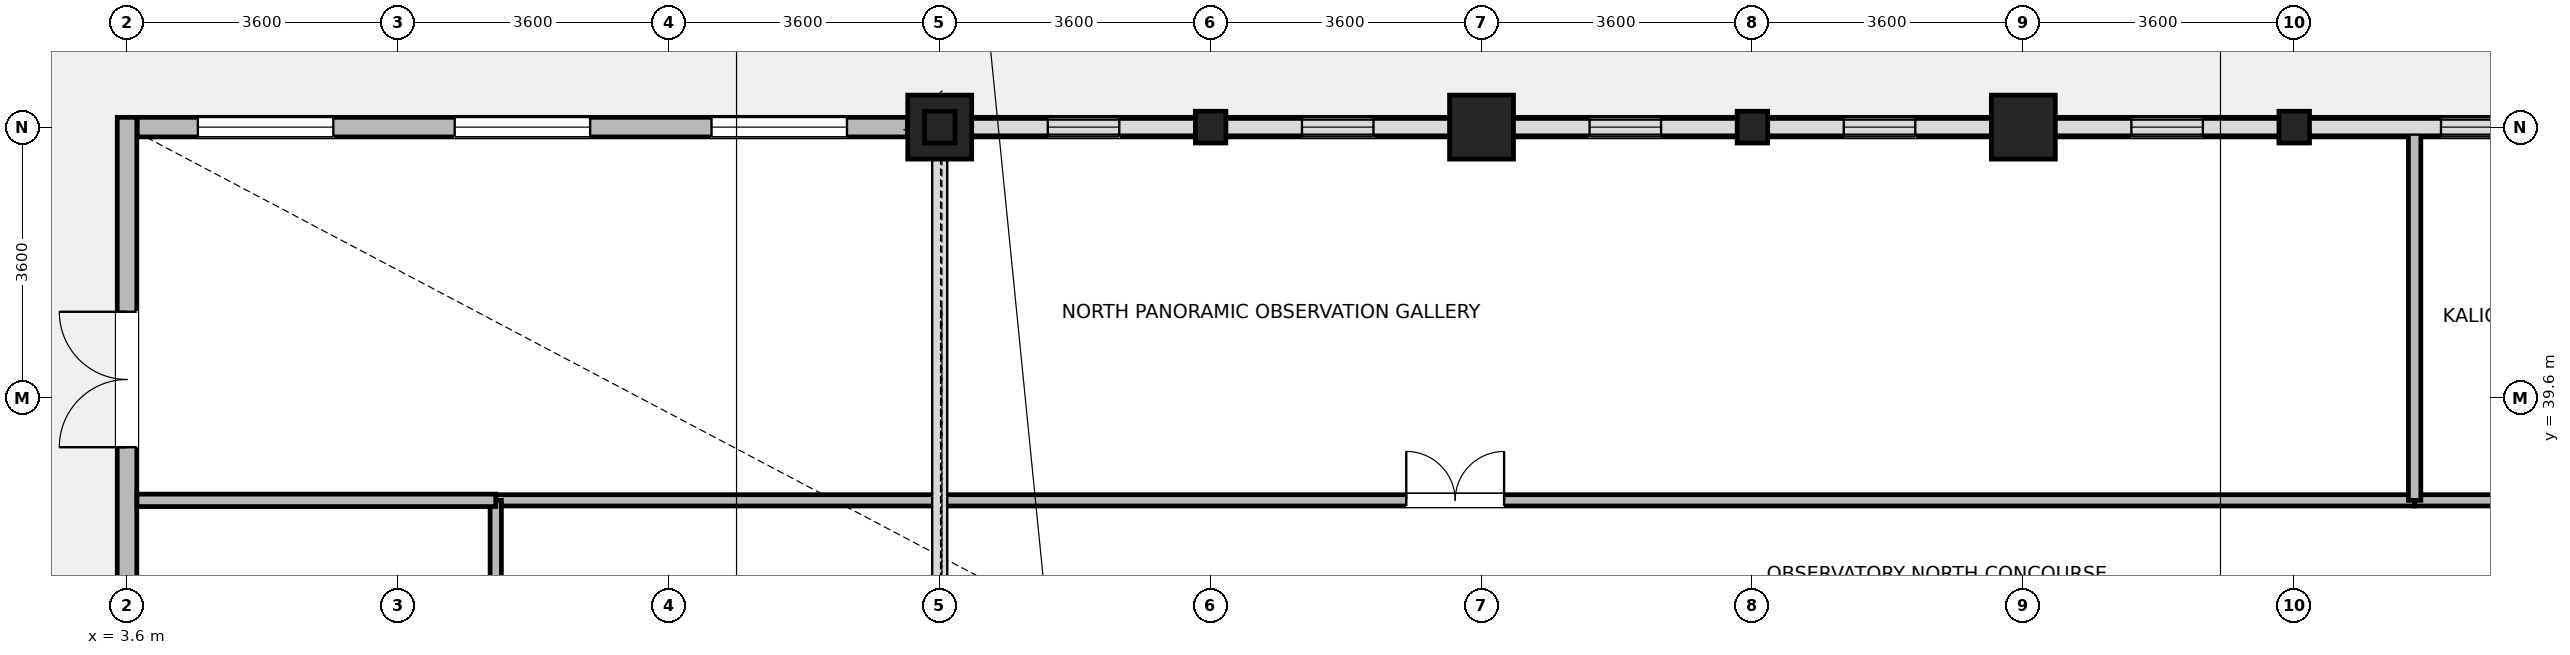
"""IFC4 building model, lengths in metres.
Left out: names, types, materials, properties, quantities, classifications, styles, units other than length and angle.
Written with IfcOpenShell. Run it as: python <this file> out.ifc"""

import sys

from ifc_helpers import new_model, si_unit, direction, frame, frame_2d, origin, origin_2d, place, context, subcontext, project, spatial, rectangle, i_section, extrude, source, transform, mapped, element, fill, save


model = new_model("IFC4")
c1 = context("Model", 3, precision=1e-05, world=origin(), true_north=direction((0.0, 1.0)))
c2 = subcontext(c1, "Body", "Model", "MODEL_VIEW")
j1 = project(units=[si_unit("LENGTHUNIT", "METRE"), si_unit("PLANEANGLEUNIT", "RADIAN")], contexts=[c1])
p1 = place(None, origin())
s1 = spatial("IfcSite", under=j1, at=p1, CompositionType="ELEMENT")
p2 = place(p1, origin())
s2 = spatial("IfcBuilding", under=s1, at=p2, CompositionType="ELEMENT")
p3 = place(p2, frame((0.0, 0.0, 298.0)))
s3 = spatial("IfcBuildingStorey", under=s2, at=p3, CompositionType="ELEMENT", Elevation=298.0)
m1 = source(origin(), c2, "Body", "SweptSolid", [
    extrude(rectangle(XDim=0.85, YDim=0.85, at=origin_2d()), origin(), (0.0, 0.0, 1.0), 6.0),
])
for number, where, z_axis, x_axis in (
    (1, (14.4, 43.2, 0.0), (0.0, 0.0, 1.0), (1.0, 0.0, 0.0)),
    (2, (21.6, 43.2, 0.0), (0.0, 0.0, 1.0), (1.0, 0.0, 0.0)),
    (3, (28.8, 43.2, 0.0), (0.0, 0.0, 1.0), (1.0, 0.0, 0.0)),
):
    element("IfcColumn", number, at=place(p3, frame(where, z_axis=z_axis, x_axis=x_axis)), inside=s3, PredefinedType="COLUMN", context=c2, shape_type="MappedRepresentation", body=[
        mapped(m1, transform((0.0, 0.0, 0.0), x_axis=(1.0, 0.0, 0.0), y_axis=(0.0, 1.0, 0.0), z_axis=(0.0, 0.0, 1.0), scale=1.0)),
    ])
m2 = source(origin(), c2, "Body", "SweptSolid", [
    extrude(i_section(OverallWidth=0.406, OverallDepth=0.422, WebThickness=0.023, FlangeThickness=0.031, FilletRadius=0.015, at=origin_2d()), origin(), (0.0, 0.0, 1.0), 6.0),
])
for number, where, z_axis, x_axis in (
    (4, (18.0, 43.2, 0.0), (0.0, 0.0, 1.0), (1.0, 0.0, 0.0)),
    (5, (25.2, 43.2, 0.0), (0.0, 0.0, 1.0), (1.0, 0.0, 0.0)),
    (6, (32.4, 43.2, 0.0), (0.0, 0.0, 1.0), (1.0, 0.0, 0.0)),
):
    element("IfcColumn", number, at=place(p3, frame(where, z_axis=z_axis, x_axis=x_axis)), inside=s3, PredefinedType="COLUMN", context=c2, shape_type="MappedRepresentation", body=[
        mapped(m2, transform((0.0, 0.0, 0.0), x_axis=(1.0, 0.0, 0.0), y_axis=(0.0, 1.0, 0.0), z_axis=(0.0, 0.0, 1.0), scale=1.0)),
    ])
m3 = source(origin(), c2, "Body", "SweptSolid", [
    extrude(i_section(OverallWidth=0.406, OverallDepth=0.422, WebThickness=0.023, FlangeThickness=0.031, FilletRadius=0.015, at=origin_2d()), origin(), (0.0, 0.0, 1.0), 15.0),
])
p4 = place(p3, frame((14.4, 43.2, 6.0), z_axis=(0.0, 0.0, 1.0), x_axis=(1.0, 0.0, 0.0)))
e7 = element("IfcColumn", 7, at=p4, inside=s3, PredefinedType="COLUMN", context=c2, shape_type="MappedRepresentation", body=[
    mapped(m3, transform((0.0, 0.0, 0.0), x_axis=(1.0, 0.0, 0.0), y_axis=(0.0, 1.0, 0.0), z_axis=(0.0, 0.0, 1.0), scale=1.0)),
])
p5 = place(p3, frame((32.604, 43.2, 0.0), z_axis=(0.0, 0.0, 1.0), x_axis=(1.0, 0.0, 0.0)))
e8 = element("IfcWall", 8, at=p5, inside=s3, PredefinedType="STANDARD", context=c2, shape_type="SweptSolid", body=[
    extrude(rectangle(XDim=2.97, YDim=0.26, at=frame_2d((1.485, 0.0))), origin(), (0.0, 0.0, 1.0), 5.58),
])
p6 = place(p5, frame((1.747, 0.0, 0.85)))
e9 = element("IfcOpeningElement", 9, at=p6, cuts=e8, PredefinedType="OPENING", context=c2, shape_type="SweptSolid", body=[
    extrude(rectangle(XDim=0.95, YDim=1.75, at=frame_2d((0.475, 0.875))), frame((0.0, 0.14, 0.0), z_axis=(0.0, -1.0, 0.0), x_axis=(1.0, 0.0, 0.0)), (0.0, 0.0, 1.0), 0.28),
])
p7 = place(p3, frame((29.226, 43.2, 0.0), z_axis=(0.0, 0.0, 1.0), x_axis=(1.0, 0.0, 0.0)))
e10 = element("IfcWall", 10, at=p7, inside=s3, PredefinedType="STANDARD", context=c2, shape_type="SweptSolid", body=[
    extrude(rectangle(XDim=2.97, YDim=0.26, at=frame_2d((1.485, 0.0))), origin(), (0.0, 0.0, 1.0), 5.58),
])
p8 = place(p7, frame((1.01, 0.0, 0.85)))
e11 = element("IfcOpeningElement", 11, at=p8, cuts=e10, PredefinedType="OPENING", context=c2, shape_type="SweptSolid", body=[
    extrude(rectangle(XDim=0.95, YDim=1.75, at=frame_2d((0.475, 0.875))), frame((0.0, 0.14, 0.0), z_axis=(0.0, -1.0, 0.0), x_axis=(1.0, 0.0, 0.0)), (0.0, 0.0, 1.0), 0.28),
])
p9 = place(p3, frame((25.404, 43.2, 0.0), z_axis=(0.0, 0.0, 1.0), x_axis=(1.0, 0.0, 0.0)))
e12 = element("IfcWall", 12, at=p9, inside=s3, PredefinedType="STANDARD", context=c2, shape_type="SweptSolid", body=[
    extrude(rectangle(XDim=2.97, YDim=0.26, at=frame_2d((1.485, 0.0))), origin(), (0.0, 0.0, 1.0), 5.58),
])
p10 = place(p9, frame((1.01, 0.0, 0.85)))
e13 = element("IfcOpeningElement", 13, at=p10, cuts=e12, PredefinedType="OPENING", context=c2, shape_type="SweptSolid", body=[
    extrude(rectangle(XDim=0.95, YDim=1.75, at=frame_2d((0.475, 0.875))), frame((0.0, 0.14, 0.0), z_axis=(0.0, -1.0, 0.0), x_axis=(1.0, 0.0, 0.0)), (0.0, 0.0, 1.0), 0.28),
])
p11 = place(p3, frame((22.026, 43.2, 0.0), z_axis=(0.0, 0.0, 1.0), x_axis=(1.0, 0.0, 0.0)))
e14 = element("IfcWall", 14, at=p11, inside=s3, PredefinedType="STANDARD", context=c2, shape_type="SweptSolid", body=[
    extrude(rectangle(XDim=2.97, YDim=0.26, at=frame_2d((1.485, 0.0))), origin(), (0.0, 0.0, 1.0), 5.58),
])
p12 = place(p11, frame((1.01, 0.0, 0.85)))
e15 = element("IfcOpeningElement", 15, at=p12, cuts=e14, PredefinedType="OPENING", context=c2, shape_type="SweptSolid", body=[
    extrude(rectangle(XDim=0.95, YDim=1.75, at=frame_2d((0.475, 0.875))), frame((0.0, 0.14, 0.0), z_axis=(0.0, -1.0, 0.0), x_axis=(1.0, 0.0, 0.0)), (0.0, 0.0, 1.0), 0.28),
])
p13 = place(p3, frame((18.204, 43.2, 0.0), z_axis=(0.0, 0.0, 1.0), x_axis=(1.0, 0.0, 0.0)))
e16 = element("IfcWall", 16, at=p13, inside=s3, PredefinedType="STANDARD", context=c2, shape_type="SweptSolid", body=[
    extrude(rectangle(XDim=2.97, YDim=0.26, at=frame_2d((1.485, 0.0))), origin(), (0.0, 0.0, 1.0), 5.58),
])
p14 = place(p13, frame((1.01, 0.0, 0.85)))
e17 = element("IfcOpeningElement", 17, at=p14, cuts=e16, PredefinedType="OPENING", context=c2, shape_type="SweptSolid", body=[
    extrude(rectangle(XDim=0.95, YDim=1.75, at=frame_2d((0.475, 0.875))), frame((0.0, 0.14, 0.0), z_axis=(0.0, -1.0, 0.0), x_axis=(1.0, 0.0, 0.0)), (0.0, 0.0, 1.0), 0.28),
])
p15 = place(p3, frame((14.826, 43.2, 0.0), z_axis=(0.0, 0.0, 1.0), x_axis=(1.0, 0.0, 0.0)))
e18 = element("IfcWall", 18, at=p15, inside=s3, PredefinedType="STANDARD", context=c2, shape_type="SweptSolid", body=[
    extrude(rectangle(XDim=2.97, YDim=0.26, at=frame_2d((1.485, 0.0))), origin(), (0.0, 0.0, 1.0), 5.58),
])
p16 = place(p15, frame((1.01, 0.0, 0.85)))
e19 = element("IfcOpeningElement", 19, at=p16, cuts=e18, PredefinedType="OPENING", context=c2, shape_type="SweptSolid", body=[
    extrude(rectangle(XDim=0.95, YDim=1.75, at=frame_2d((0.475, 0.875))), frame((0.0, 0.14, 0.0), z_axis=(0.0, -1.0, 0.0), x_axis=(1.0, 0.0, 0.0)), (0.0, 0.0, 1.0), 0.28),
])
p17 = place(p3, frame((3.735, 43.2, 0.0), z_axis=(0.0, 0.0, 1.0), x_axis=(1.0, 0.0, 0.0)))
e20 = element("IfcWall", 20, at=p17, inside=s3, PredefinedType="STANDARD", context=c2, shape_type="SweptSolid", body=[
    extrude(rectangle(XDim=10.239, YDim=0.26, at=frame_2d((5.12, 0.0))), origin(), (0.0, 0.0, 1.0), 5.9),
])
p18 = place(p17, frame((0.806, 0.0, 0.85)))
e21 = element("IfcOpeningElement", 21, at=p18, cuts=e20, PredefinedType="OPENING", context=c2, shape_type="SweptSolid", body=[
    extrude(rectangle(XDim=1.8, YDim=1.85, at=frame_2d((0.9, 0.925))), frame((0.0, 0.14, 0.0), z_axis=(0.0, -1.0, 0.0), x_axis=(1.0, 0.0, 0.0)), (0.0, 0.0, 1.0), 0.28),
])
p19 = place(p17, frame((4.219, 0.0, 0.85)))
e22 = element("IfcOpeningElement", 22, at=p19, cuts=e20, PredefinedType="OPENING", context=c2, shape_type="SweptSolid", body=[
    extrude(rectangle(XDim=1.8, YDim=1.85, at=frame_2d((0.9, 0.925))), frame((0.0, 0.14, 0.0), z_axis=(0.0, -1.0, 0.0), x_axis=(1.0, 0.0, 0.0)), (0.0, 0.0, 1.0), 0.28),
])
p20 = place(p17, frame((7.633, 0.0, 0.85)))
e23 = element("IfcOpeningElement", 23, at=p20, cuts=e20, PredefinedType="OPENING", context=c2, shape_type="SweptSolid", body=[
    extrude(rectangle(XDim=1.8, YDim=1.85, at=frame_2d((0.9, 0.925))), frame((0.0, 0.14, 0.0), z_axis=(0.0, -1.0, 0.0), x_axis=(1.0, 0.0, 0.0)), (0.0, 0.0, 1.0), 0.28),
])
p21 = place(p3, frame((3.6, 36.362, 0.0), z_axis=(0.0, 0.0, 1.0), x_axis=(0.0, 1.0, 0.0)))
e24 = element("IfcWall", 24, at=p21, inside=s3, PredefinedType="STANDARD", context=c2, shape_type="SweptSolid", body=[
    extrude(rectangle(XDim=6.968, YDim=0.26, at=frame_2d((3.484, 0.0))), origin(), (0.0, 0.0, 1.0), 5.9),
])
p22 = place(p21, frame((2.584, 0.0, 0.0)))
e25 = element("IfcOpeningElement", 25, at=p22, cuts=e24, PredefinedType="OPENING", context=c2, shape_type="SweptSolid", body=[
    extrude(rectangle(XDim=1.8, YDim=2.2, at=frame_2d((0.9, 1.1))), frame((0.0, 0.14, 0.0), z_axis=(0.0, -1.0, 0.0), x_axis=(1.0, 0.0, 0.0)), (0.0, 0.0, 1.0), 0.28),
])
p23 = place(p3, frame((8.5, 38.24, 0.0), z_axis=(0.0, 0.0, 1.0), x_axis=(1.0, 0.0, 0.0)))
e26 = element("IfcWall", 26, at=p23, inside=s3, PredefinedType="PARTITIONING", context=c2, shape_type="SweptSolid", body=[
    extrude(rectangle(XDim=25.5, YDim=0.15, at=frame_2d((12.75, 0.0))), origin(), (0.0, 0.0, 1.0), 5.9),
])
p24 = place(p23, frame((12.1, 0.0, 0.0)))
e27 = element("IfcOpeningElement", 27, at=p24, cuts=e26, PredefinedType="OPENING", context=c2, shape_type="SweptSolid", body=[
    extrude(rectangle(XDim=1.3, YDim=2.12, at=frame_2d((0.65, 1.06))), frame((0.0, 0.085, 0.0), z_axis=(0.0, -1.0, 0.0), x_axis=(1.0, 0.0, 0.0)), (0.0, 0.0, 1.0), 0.17),
])
p25 = place(p3, frame((34.0, 38.24, 0.0), z_axis=(0.0, 0.0, 1.0), x_axis=(1.0, 0.0, 0.0)))
e28 = element("IfcWall", 28, at=p25, inside=s3, PredefinedType="PARTITIONING", context=c2, shape_type="SweptSolid", body=[
    extrude(rectangle(XDim=12.78, YDim=0.15, at=frame_2d((6.39, 0.0))), origin(), (0.0, 0.0, 1.0), 5.9),
])
p26 = place(p25, frame((5.94, 0.0, 0.0)))
e29 = element("IfcOpeningElement", 29, at=p26, cuts=e28, PredefinedType="OPENING", context=c2, shape_type="SweptSolid", body=[
    extrude(rectangle(XDim=0.9, YDim=2.08, at=frame_2d((0.45, 1.04))), frame((0.0, 0.085, 0.0), z_axis=(0.0, -1.0, 0.0), x_axis=(1.0, 0.0, 0.0)), (0.0, 0.0, 1.0), 0.17),
])
p27 = place(p3, frame((8.5, 36.24, 0.0), z_axis=(0.0, 0.0, 1.0), x_axis=(0.0, 1.0, 0.0)))
e30 = element("IfcWall", 30, at=p27, inside=s3, PredefinedType="PARTITIONING", context=c2, shape_type="SweptSolid", body=[
    extrude(rectangle(XDim=2.0, YDim=0.15, at=frame_2d((1.0, 0.0))), origin(), (0.0, 0.0, 1.0), 5.9),
])
p28 = place(p3, frame((34.0, 38.24, 0.0), z_axis=(0.0, 0.0, 1.0), x_axis=(0.0, 1.0, 0.0)))
e31 = element("IfcWall", 31, at=p28, inside=s3, PredefinedType="PARTITIONING", context=c2, shape_type="SweptSolid", body=[
    extrude(rectangle(XDim=4.94, YDim=0.165, at=frame_2d((2.47, 0.0))), origin(), (0.0, 0.0, 1.0), 5.9),
])
p29 = place(p3, frame((3.732, 38.24, 0.0), z_axis=(0.0, 0.0, 1.0), x_axis=(1.0, 0.0, 0.0)))
e32 = element("IfcWall", 32, at=p29, inside=s3, PredefinedType="PARTITIONING", context=c2, shape_type="SweptSolid", body=[
    extrude(rectangle(XDim=4.768, YDim=0.165, at=frame_2d((2.384, 0.0))), origin(), (0.0, 0.0, 1.0), 5.9),
])
p30 = place(p6, origin())
e33 = element("IfcWindow", 33, at=p30, inside=s3, PartitioningType="SINGLE_PANEL", PredefinedType="WINDOW", context=c2, shape_type="SweptSolid", body=[
    extrude(rectangle(XDim=0.95, YDim=1.75, at=frame_2d((0.475, 0.875))), frame((0.0, 0.03, 0.0), z_axis=(0.0, -1.0, 0.0), x_axis=(1.0, 0.0, 0.0)), (0.0, 0.0, 1.0), 0.06),
])
fill(e9, e33)
p31 = place(p8, origin())
e34 = element("IfcWindow", 34, at=p31, inside=s3, PartitioningType="SINGLE_PANEL", PredefinedType="WINDOW", context=c2, shape_type="SweptSolid", body=[
    extrude(rectangle(XDim=0.95, YDim=1.75, at=frame_2d((0.475, 0.875))), frame((0.0, 0.03, 0.0), z_axis=(0.0, -1.0, 0.0), x_axis=(1.0, 0.0, 0.0)), (0.0, 0.0, 1.0), 0.06),
])
fill(e11, e34)
p32 = place(p10, origin())
e35 = element("IfcWindow", 35, at=p32, inside=s3, PartitioningType="SINGLE_PANEL", PredefinedType="WINDOW", context=c2, shape_type="SweptSolid", body=[
    extrude(rectangle(XDim=0.95, YDim=1.75, at=frame_2d((0.475, 0.875))), frame((0.0, 0.03, 0.0), z_axis=(0.0, -1.0, 0.0), x_axis=(1.0, 0.0, 0.0)), (0.0, 0.0, 1.0), 0.06),
])
fill(e13, e35)
p33 = place(p12, origin())
e36 = element("IfcWindow", 36, at=p33, inside=s3, PartitioningType="SINGLE_PANEL", PredefinedType="WINDOW", context=c2, shape_type="SweptSolid", body=[
    extrude(rectangle(XDim=0.95, YDim=1.75, at=frame_2d((0.475, 0.875))), frame((0.0, 0.03, 0.0), z_axis=(0.0, -1.0, 0.0), x_axis=(1.0, 0.0, 0.0)), (0.0, 0.0, 1.0), 0.06),
])
fill(e15, e36)
p34 = place(p14, origin())
e37 = element("IfcWindow", 37, at=p34, inside=s3, PartitioningType="SINGLE_PANEL", PredefinedType="WINDOW", context=c2, shape_type="SweptSolid", body=[
    extrude(rectangle(XDim=0.95, YDim=1.75, at=frame_2d((0.475, 0.875))), frame((0.0, 0.03, 0.0), z_axis=(0.0, -1.0, 0.0), x_axis=(1.0, 0.0, 0.0)), (0.0, 0.0, 1.0), 0.06),
])
fill(e17, e37)
p35 = place(p16, origin())
e38 = element("IfcWindow", 38, at=p35, inside=s3, PartitioningType="SINGLE_PANEL", PredefinedType="WINDOW", context=c2, shape_type="SweptSolid", body=[
    extrude(rectangle(XDim=0.95, YDim=1.75, at=frame_2d((0.475, 0.875))), frame((0.0, 0.03, 0.0), z_axis=(0.0, -1.0, 0.0), x_axis=(1.0, 0.0, 0.0)), (0.0, 0.0, 1.0), 0.06),
])
fill(e19, e38)
p36 = place(p18, origin())
e39 = element("IfcWindow", 39, at=p36, inside=s3, PartitioningType="SINGLE_PANEL", PredefinedType="WINDOW", context=c2, shape_type="SweptSolid", body=[
    extrude(rectangle(XDim=1.8, YDim=1.85, at=frame_2d((0.9, 0.925))), frame((0.0, 0.03, 0.0), z_axis=(0.0, -1.0, 0.0), x_axis=(1.0, 0.0, 0.0)), (0.0, 0.0, 1.0), 0.06),
])
fill(e21, e39)
p37 = place(p19, origin())
e40 = element("IfcWindow", 40, at=p37, inside=s3, PartitioningType="SINGLE_PANEL", PredefinedType="WINDOW", context=c2, shape_type="SweptSolid", body=[
    extrude(rectangle(XDim=1.8, YDim=1.85, at=frame_2d((0.9, 0.925))), frame((0.0, 0.03, 0.0), z_axis=(0.0, -1.0, 0.0), x_axis=(1.0, 0.0, 0.0)), (0.0, 0.0, 1.0), 0.06),
])
fill(e22, e40)
p38 = place(p20, origin())
e41 = element("IfcWindow", 41, at=p38, inside=s3, PartitioningType="SINGLE_PANEL", PredefinedType="WINDOW", context=c2, shape_type="SweptSolid", body=[
    extrude(rectangle(XDim=1.8, YDim=1.85, at=frame_2d((0.9, 0.925))), frame((0.0, 0.03, 0.0), z_axis=(0.0, -1.0, 0.0), x_axis=(1.0, 0.0, 0.0)), (0.0, 0.0, 1.0), 0.06),
])
fill(e23, e41)
p39 = place(p22, origin())
e42 = element("IfcDoor", 42, at=p39, inside=s3, OperationType="DOUBLE_DOOR_SINGLE_SWING", PredefinedType="DOOR", context=c2, shape_type="SweptSolid", body=[
    extrude(rectangle(XDim=1.8, YDim=2.2, at=frame_2d((0.9, 1.1))), frame((0.0, 0.025, 0.0), z_axis=(0.0, -1.0, 0.0), x_axis=(1.0, 0.0, 0.0)), (0.0, 0.0, 1.0), 0.05),
])
fill(e25, e42)
p40 = place(p24, origin())
e43 = element("IfcDoor", 43, at=p40, inside=s3, OperationType="DOUBLE_DOOR_SINGLE_SWING", PredefinedType="DOOR", context=c2, shape_type="SweptSolid", body=[
    extrude(rectangle(XDim=1.3, YDim=2.12, at=frame_2d((0.65, 1.06))), frame((0.0, 0.025, 0.0), z_axis=(0.0, -1.0, 0.0), x_axis=(1.0, 0.0, 0.0)), (0.0, 0.0, 1.0), 0.05),
])
fill(e27, e43)
save(model, sys.argv[1])
